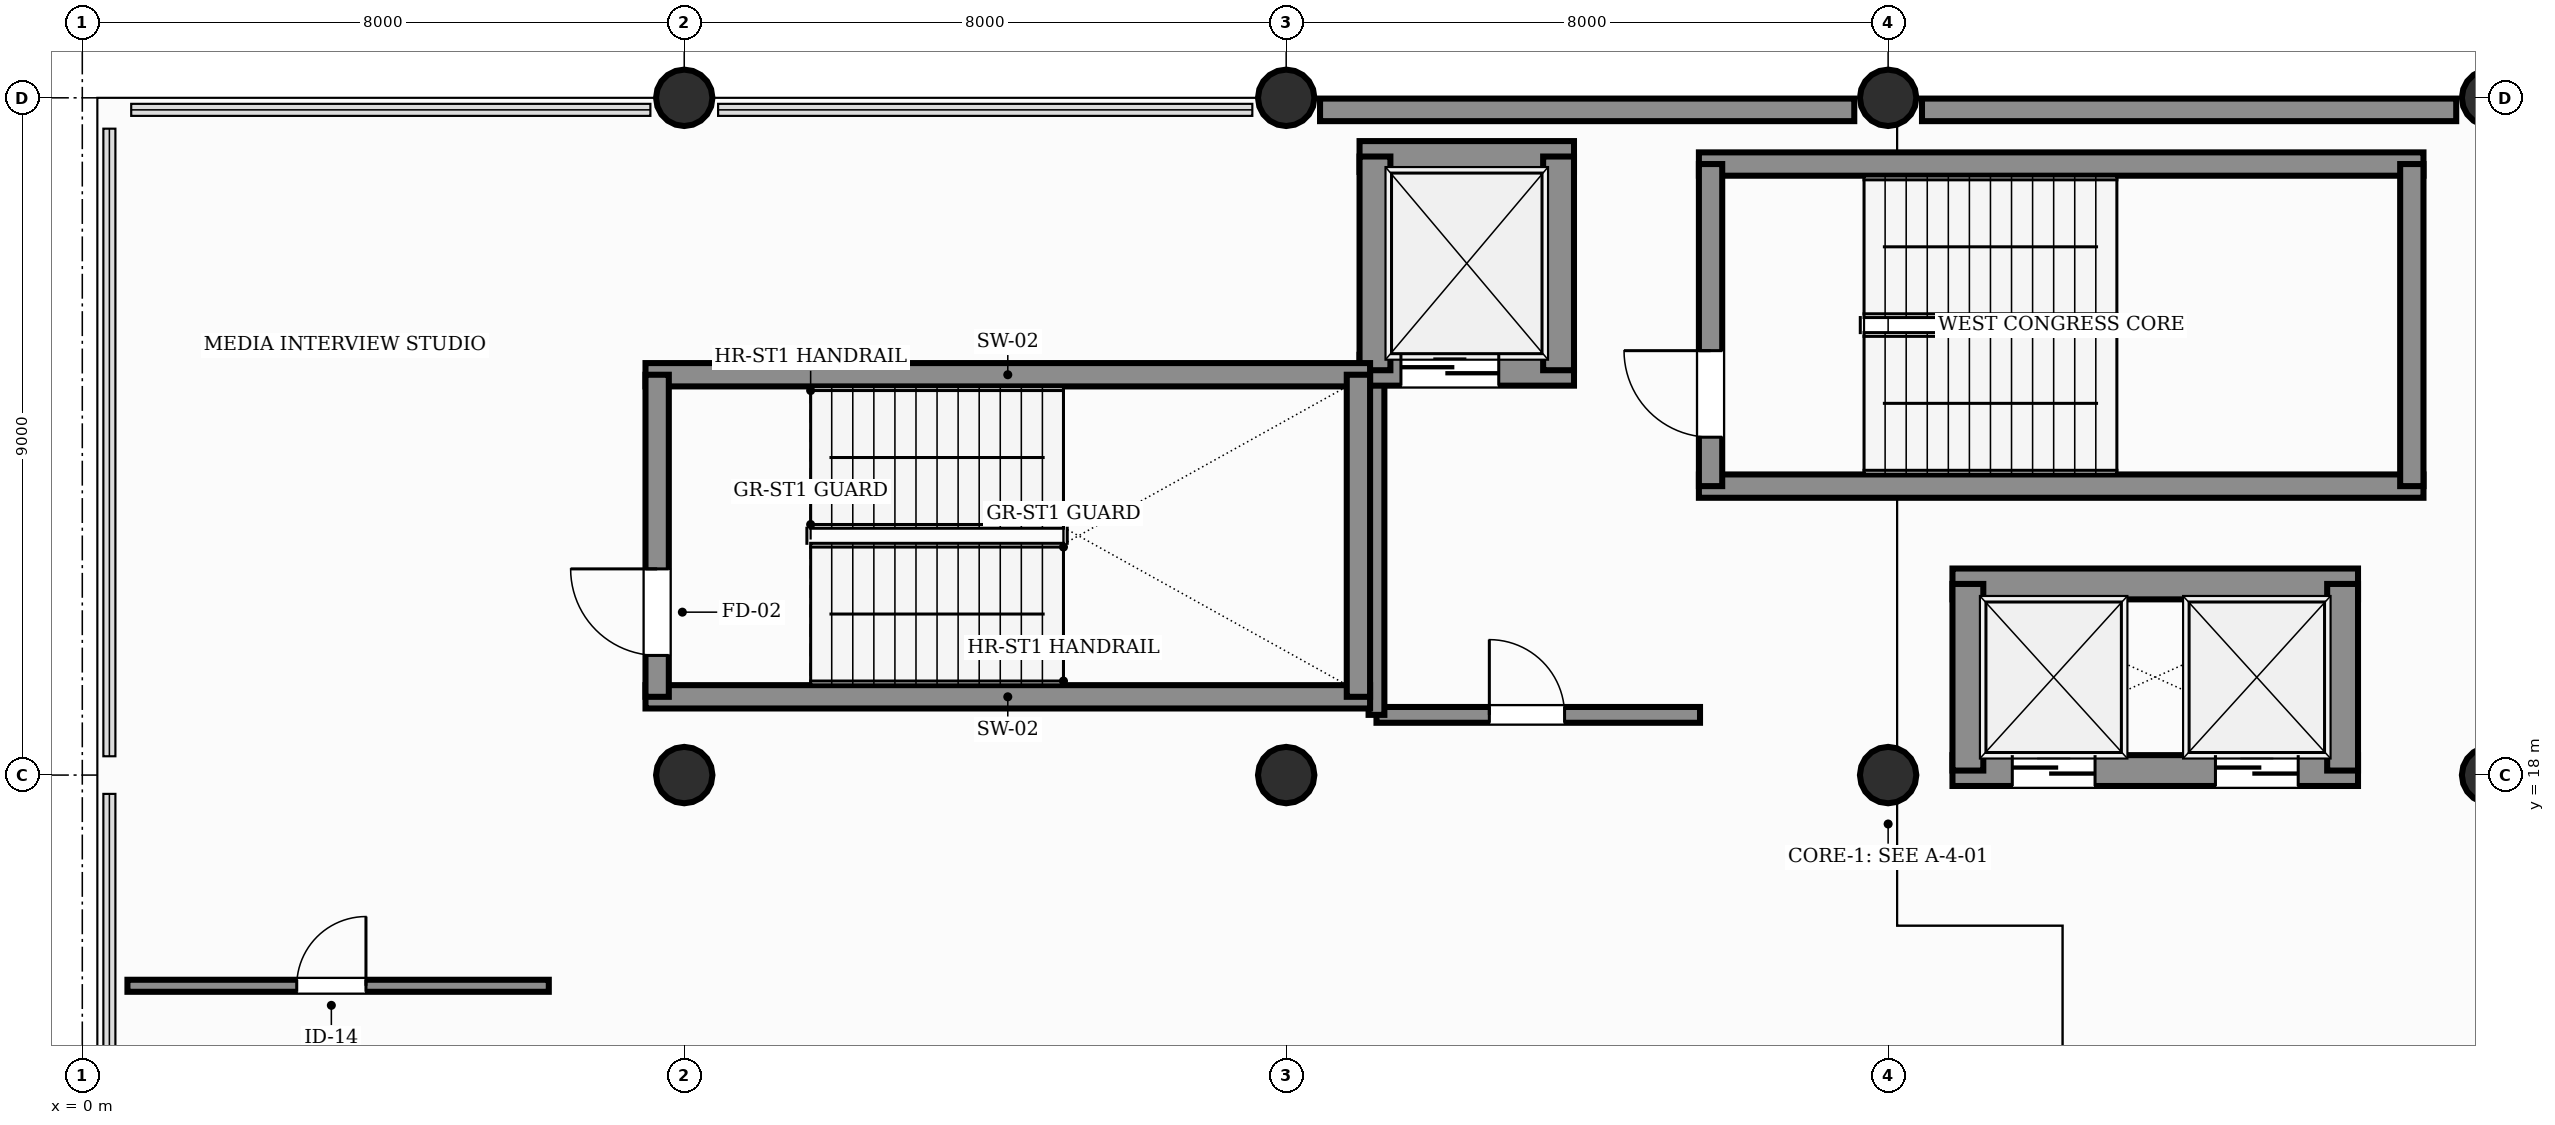
"""IFC4 building model, lengths in metres.
Left out: names, types, materials, properties, quantities, classifications, styles, units other than length and angle.
Written with IfcOpenShell. Run it as: python <this file> out.ifc"""

import sys

from ifc_helpers import new_model, si_unit, direction, frame, frame_2d, origin, origin_2d, place, context, subcontext, project, spatial, rectangle, circle, extrude, element, fill, save


model = new_model("IFC4")
c1 = context("Model", 3, precision=1e-05, world=origin(), true_north=direction((0.0, 1.0)))
c2 = subcontext(c1, "Body", "Model", "MODEL_VIEW")
j1 = project(units=[si_unit("LENGTHUNIT", "METRE"), si_unit("PLANEANGLEUNIT", "RADIAN")], contexts=[c1])
p1 = place(None, origin())
s1 = spatial("IfcSite", under=j1, at=p1, CompositionType="ELEMENT")
p2 = place(p1, origin())
s2 = spatial("IfcBuilding", under=s1, at=p2, CompositionType="ELEMENT")
p3 = place(p2, frame((0.0, 0.0, 16.2)))
s3 = spatial("IfcBuildingStorey", under=s2, at=p3, CompositionType="ELEMENT", Elevation=16.2)
for number, where, z_axis, x_axis in (
    (1, (8.0, 18.0, 0.0), (0.0, 0.0, 1.0), (1.0, 0.0, 0.0)),
    (2, (8.0, 27.0, 0.0), (0.0, 0.0, 1.0), (1.0, 0.0, 0.0)),
    (3, (16.0, 18.0, 0.0), (0.0, 0.0, 1.0), (1.0, 0.0, 0.0)),
    (4, (16.0, 27.0, 0.0), (0.0, 0.0, 1.0), (1.0, 0.0, 0.0)),
    (5, (24.0, 18.0, 0.0), (0.0, 0.0, 1.0), (1.0, 0.0, 0.0)),
    (6, (24.0, 27.0, 0.0), (0.0, 0.0, 1.0), (1.0, 0.0, 0.0)),
    (7, (32.0, 18.0, 0.0), (0.0, 0.0, 1.0), (1.0, 0.0, 0.0)),
    (8, (32.0, 27.0, 0.0), (0.0, 0.0, 1.0), (1.0, 0.0, 0.0)),
):
    element("IfcColumn", number, at=place(p3, frame(where, z_axis=z_axis, x_axis=x_axis)), inside=s3, PredefinedType="COLUMN", context=c2, shape_type="SweptSolid", body=[
        extrude(circle(Radius=0.375, at=origin_2d()), origin(), (0.0, 0.0, 1.0), 4.8),
    ])
for number, where, z_axis, x_axis in (
    (9, (16.45, 26.84, 0.0), (0.0, 0.0, 1.0), (1.0, 0.0, 0.0)),
    (10, (24.45, 26.84, 0.0), (0.0, 0.0, 1.0), (1.0, 0.0, 0.0)),
):
    element("IfcWall", number, at=place(p3, frame(where, z_axis=z_axis, x_axis=x_axis)), inside=s3, PredefinedType="SOLIDWALL", context=c2, shape_type="SweptSolid", body=[
        extrude(rectangle(XDim=7.1, YDim=0.3, at=frame_2d((3.55, 0.0))), origin(), (0.0, 0.0, 1.0), 3.6),
    ])
for number, where, z_axis, x_axis in (
    (11, (21.485, 21.84, 0.0), (0.0, 0.0, 1.0), (1.0, 0.0, 0.0)),
    (12, (21.485, 26.12, 0.0), (0.0, 0.0, 1.0), (1.0, 0.0, 0.0)),
):
    element("IfcWall", number, at=place(p3, frame(where, z_axis=z_axis, x_axis=x_axis)), inside=s3, PredefinedType="SHEAR", context=c2, shape_type="SweptSolid", body=[
        extrude(rectangle(XDim=9.63, YDim=0.31, at=frame_2d((4.815, 0.0))), origin(), (0.0, 0.0, 1.0), 4.8),
    ])
p4 = place(p3, frame((21.64, 21.84, 0.0), z_axis=(0.0, 0.0, 1.0), x_axis=(0.0, 1.0, 0.0)))
e13 = element("IfcWall", 13, at=p4, inside=s3, PredefinedType="SHEAR", context=c2, shape_type="SweptSolid", body=[
    extrude(rectangle(XDim=4.28, YDim=0.31, at=frame_2d((2.14, 0.0))), origin(), (0.0, 0.0, 1.0), 4.8),
])
p5 = place(p4, frame((0.65, 0.0, 0.0)))
e14 = element("IfcOpeningElement", 14, at=p5, cuts=e13, PredefinedType="OPENING", context=c2, shape_type="SweptSolid", body=[
    extrude(rectangle(XDim=1.15, YDim=2.2, at=frame_2d((0.575, 1.1))), frame((0.0, 0.165, 0.0), z_axis=(0.0, -1.0, 0.0), x_axis=(1.0, 0.0, 0.0)), (0.0, 0.0, 1.0), 0.33),
])
p6 = place(p3, frame((30.96, 21.84, 0.0), z_axis=(0.0, 0.0, 1.0), x_axis=(0.0, 1.0, 0.0)))
e15 = element("IfcWall", 15, at=p6, inside=s3, PredefinedType="SHEAR", context=c2, shape_type="SweptSolid", body=[
    extrude(rectangle(XDim=4.28, YDim=0.31, at=frame_2d((2.14, 0.0))), origin(), (0.0, 0.0, 1.0), 4.8),
])
p7 = place(p3, frame((17.2, 18.8, 0.0), z_axis=(0.0, 0.0, 1.0), x_axis=(1.0, 0.0, 0.0)))
e16 = element("IfcWall", 16, at=p7, inside=s3, PredefinedType="PARTITIONING", context=c2, shape_type="SweptSolid", body=[
    extrude(rectangle(XDim=4.3, YDim=0.21, at=frame_2d((2.15, 0.0))), origin(), (0.0, 0.0, 1.0), 3.55),
])
p8 = place(p7, frame((1.5, 0.0, 0.0)))
e17 = element("IfcOpeningElement", 17, at=p8, cuts=e16, PredefinedType="OPENING", context=c2, shape_type="SweptSolid", body=[
    extrude(rectangle(XDim=1.0, YDim=2.15, at=frame_2d((0.5, 1.075))), frame((0.0, 0.115, 0.0), z_axis=(0.0, -1.0, 0.0), x_axis=(1.0, 0.0, 0.0)), (0.0, 0.0, 1.0), 0.23),
])
p9 = place(p3, frame((17.2, 18.8, 0.0), z_axis=(0.0, 0.0, 1.0), x_axis=(0.0, 1.0, 0.0)))
e18 = element("IfcWall", 18, at=p9, inside=s3, PredefinedType="PARTITIONING", context=c2, shape_type="SweptSolid", body=[
    extrude(rectangle(XDim=4.6, YDim=0.21, at=frame_2d((2.3, 0.0))), origin(), (0.0, 0.0, 1.0), 3.55),
])
p10 = place(p3, frame((16.975, 23.38, 0.0), z_axis=(0.0, 0.0, 1.0), x_axis=(1.0, 0.0, 0.0)))
e19 = element("IfcWall", 19, at=p10, inside=s3, PredefinedType="SHEAR", context=c2, shape_type="SweptSolid", body=[
    extrude(rectangle(XDim=2.85, YDim=0.41, at=frame_2d((1.425, 0.0))), origin(), (0.0, 0.0, 1.0), 4.8),
])
p11 = place(p10, frame((0.55, 0.0, 0.0)))
e20 = element("IfcOpeningElement", 20, at=p11, cuts=e19, PredefinedType="OPENING", context=c2, shape_type="SweptSolid", body=[
    extrude(rectangle(XDim=1.3, YDim=2.25, at=frame_2d((0.65, 1.125))), frame((0.0, 0.215, 0.0), z_axis=(0.0, -1.0, 0.0), x_axis=(1.0, 0.0, 0.0)), (0.0, 0.0, 1.0), 0.43),
])
p12 = place(p3, frame((16.975, 26.22, 0.0), z_axis=(0.0, 0.0, 1.0), x_axis=(1.0, 0.0, 0.0)))
e21 = element("IfcWall", 21, at=p12, inside=s3, PredefinedType="SHEAR", context=c2, shape_type="SweptSolid", body=[
    extrude(rectangle(XDim=2.85, YDim=0.41, at=frame_2d((1.425, 0.0))), origin(), (0.0, 0.0, 1.0), 4.8),
])
for number, where, z_axis, x_axis in (
    (22, (17.18, 23.38, 0.0), (0.0, 0.0, 1.0), (0.0, 1.0, 0.0)),
    (23, (19.62, 23.38, 0.0), (0.0, 0.0, 1.0), (0.0, 1.0, 0.0)),
):
    element("IfcWall", number, at=place(p3, frame(where, z_axis=z_axis, x_axis=x_axis)), inside=s3, PredefinedType="SHEAR", context=c2, shape_type="SweptSolid", body=[
        extrude(rectangle(XDim=2.84, YDim=0.41, at=frame_2d((1.42, 0.0))), origin(), (0.0, 0.0, 1.0), 4.8),
    ])
p13 = place(p3, frame((24.855, 18.06, 0.0), z_axis=(0.0, 0.0, 1.0), x_axis=(1.0, 0.0, 0.0)))
e24 = element("IfcWall", 24, at=p13, inside=s3, PredefinedType="SHEAR", context=c2, shape_type="SweptSolid", body=[
    extrude(rectangle(XDim=5.39, YDim=0.41, at=frame_2d((2.695, 0.0))), origin(), (0.0, 0.0, 1.0), 4.8),
])
p14 = place(p13, frame((0.795, 0.0, 0.0)))
e25 = element("IfcOpeningElement", 25, at=p14, cuts=e24, PredefinedType="OPENING", context=c2, shape_type="SweptSolid", body=[
    extrude(rectangle(XDim=1.1, YDim=2.2, at=frame_2d((0.55, 1.1))), frame((0.0, 0.215, 0.0), z_axis=(0.0, -1.0, 0.0), x_axis=(1.0, 0.0, 0.0)), (0.0, 0.0, 1.0), 0.43),
])
p15 = place(p13, frame((3.495, 0.0, 0.0)))
e26 = element("IfcOpeningElement", 26, at=p15, cuts=e24, PredefinedType="OPENING", context=c2, shape_type="SweptSolid", body=[
    extrude(rectangle(XDim=1.1, YDim=2.2, at=frame_2d((0.55, 1.1))), frame((0.0, 0.215, 0.0), z_axis=(0.0, -1.0, 0.0), x_axis=(1.0, 0.0, 0.0)), (0.0, 0.0, 1.0), 0.43),
])
p16 = place(p3, frame((24.855, 20.54, 0.0), z_axis=(0.0, 0.0, 1.0), x_axis=(1.0, 0.0, 0.0)))
e27 = element("IfcWall", 27, at=p16, inside=s3, PredefinedType="SHEAR", context=c2, shape_type="SweptSolid", body=[
    extrude(rectangle(XDim=5.39, YDim=0.41, at=frame_2d((2.695, 0.0))), origin(), (0.0, 0.0, 1.0), 4.8),
])
for number, where, z_axis, x_axis in (
    (28, (25.06, 18.06, 0.0), (0.0, 0.0, 1.0), (0.0, 1.0, 0.0)),
    (29, (30.04, 18.06, 0.0), (0.0, 0.0, 1.0), (0.0, 1.0, 0.0)),
):
    element("IfcWall", number, at=place(p3, frame(where, z_axis=z_axis, x_axis=x_axis)), inside=s3, PredefinedType="SHEAR", context=c2, shape_type="SweptSolid", body=[
        extrude(rectangle(XDim=2.48, YDim=0.41, at=frame_2d((1.24, 0.0))), origin(), (0.0, 0.0, 1.0), 4.8),
    ])
for number, where, z_axis, x_axis in (
    (30, (7.485, 19.04, 0.0), (0.0, 0.0, 1.0), (1.0, 0.0, 0.0)),
    (31, (7.485, 23.32, 0.0), (0.0, 0.0, 1.0), (1.0, 0.0, 0.0)),
):
    element("IfcWall", number, at=place(p3, frame(where, z_axis=z_axis, x_axis=x_axis)), inside=s3, PredefinedType="SHEAR", context=c2, shape_type="SweptSolid", body=[
        extrude(rectangle(XDim=9.63, YDim=0.31, at=frame_2d((4.815, 0.0))), origin(), (0.0, 0.0, 1.0), 4.8),
    ])
p17 = place(p3, frame((7.64, 19.04, 0.0), z_axis=(0.0, 0.0, 1.0), x_axis=(0.0, 1.0, 0.0)))
e32 = element("IfcWall", 32, at=p17, inside=s3, PredefinedType="SHEAR", context=c2, shape_type="SweptSolid", body=[
    extrude(rectangle(XDim=4.28, YDim=0.31, at=frame_2d((2.14, 0.0))), origin(), (0.0, 0.0, 1.0), 4.8),
])
p18 = place(p17, frame((0.55, 0.0, 0.0)))
e33 = element("IfcOpeningElement", 33, at=p18, cuts=e32, PredefinedType="OPENING", context=c2, shape_type="SweptSolid", body=[
    extrude(rectangle(XDim=1.15, YDim=2.2, at=frame_2d((0.575, 1.1))), frame((0.0, 0.165, 0.0), z_axis=(0.0, -1.0, 0.0), x_axis=(1.0, 0.0, 0.0)), (0.0, 0.0, 1.0), 0.33),
])
p19 = place(p3, frame((16.96, 19.04, 0.0), z_axis=(0.0, 0.0, 1.0), x_axis=(0.0, 1.0, 0.0)))
e34 = element("IfcWall", 34, at=p19, inside=s3, PredefinedType="SHEAR", context=c2, shape_type="SweptSolid", body=[
    extrude(rectangle(XDim=4.28, YDim=0.31, at=frame_2d((2.14, 0.0))), origin(), (0.0, 0.0, 1.0), 4.8),
])
p20 = place(p3, frame((0.6, 15.2, 0.0), z_axis=(0.0, 0.0, 1.0), x_axis=(1.0, 0.0, 0.0)))
e35 = element("IfcWall", 35, at=p20, inside=s3, PredefinedType="PARTITIONING", context=c2, shape_type="SweptSolid", body=[
    extrude(rectangle(XDim=5.6, YDim=0.16, at=frame_2d((2.8, 0.0))), origin(), (0.0, 0.0, 1.0), 3.55),
])
p21 = place(p20, frame((2.25, 0.0, 0.0)))
e36 = element("IfcOpeningElement", 36, at=p21, cuts=e35, PredefinedType="OPENING", context=c2, shape_type="SweptSolid", body=[
    extrude(rectangle(XDim=0.92, YDim=2.15, at=frame_2d((0.46, 1.075))), frame((0.0, 0.09, 0.0), z_axis=(0.0, -1.0, 0.0), x_axis=(1.0, 0.0, 0.0)), (0.0, 0.0, 1.0), 0.18),
])
p22 = place(p5, origin())
e37 = element("IfcDoor", 37, at=p22, inside=s3, OperationType="SINGLE_SWING_RIGHT", PredefinedType="DOOR", context=c2, shape_type="SweptSolid", body=[
    extrude(rectangle(XDim=1.15, YDim=2.2, at=frame_2d((0.575, 1.1))), frame((0.0, 0.025, 0.0), z_axis=(0.0, -1.0, 0.0), x_axis=(1.0, 0.0, 0.0)), (0.0, 0.0, 1.0), 0.05),
])
fill(e14, e37)
p23 = place(p8, origin())
e38 = element("IfcDoor", 38, at=p23, inside=s3, OperationType="SINGLE_SWING_LEFT", PredefinedType="DOOR", context=c2, shape_type="SweptSolid", body=[
    extrude(rectangle(XDim=1.0, YDim=2.15, at=frame_2d((0.5, 1.075))), frame((0.0, 0.025, 0.0), z_axis=(0.0, -1.0, 0.0), x_axis=(1.0, 0.0, 0.0)), (0.0, 0.0, 1.0), 0.05),
])
fill(e17, e38)
p24 = place(p11, origin())
e39 = element("IfcDoor", 39, at=p24, inside=s3, OperationType="DOUBLE_DOOR_SLIDING", PredefinedType="DOOR", context=c2, shape_type="SweptSolid", body=[
    extrude(rectangle(XDim=1.3, YDim=2.25, at=frame_2d((0.65, 1.125))), frame((0.0, 0.025, 0.0), z_axis=(0.0, -1.0, 0.0), x_axis=(1.0, 0.0, 0.0)), (0.0, 0.0, 1.0), 0.05),
])
fill(e20, e39)
p25 = place(p14, origin())
e40 = element("IfcDoor", 40, at=p25, inside=s3, OperationType="DOUBLE_DOOR_SLIDING", PredefinedType="DOOR", context=c2, shape_type="SweptSolid", body=[
    extrude(rectangle(XDim=1.1, YDim=2.2, at=frame_2d((0.55, 1.1))), frame((0.0, 0.025, 0.0), z_axis=(0.0, -1.0, 0.0), x_axis=(1.0, 0.0, 0.0)), (0.0, 0.0, 1.0), 0.05),
])
fill(e25, e40)
p26 = place(p15, origin())
e41 = element("IfcDoor", 41, at=p26, inside=s3, OperationType="DOUBLE_DOOR_SLIDING", PredefinedType="DOOR", context=c2, shape_type="SweptSolid", body=[
    extrude(rectangle(XDim=1.1, YDim=2.2, at=frame_2d((0.55, 1.1))), frame((0.0, 0.025, 0.0), z_axis=(0.0, -1.0, 0.0), x_axis=(1.0, 0.0, 0.0)), (0.0, 0.0, 1.0), 0.05),
])
fill(e26, e41)
p27 = place(p18, origin())
e42 = element("IfcDoor", 42, at=p27, inside=s3, OperationType="SINGLE_SWING_RIGHT", PredefinedType="DOOR", context=c2, shape_type="SweptSolid", body=[
    extrude(rectangle(XDim=1.15, YDim=2.2, at=frame_2d((0.575, 1.1))), frame((0.0, 0.025, 0.0), z_axis=(0.0, -1.0, 0.0), x_axis=(1.0, 0.0, 0.0)), (0.0, 0.0, 1.0), 0.05),
])
fill(e33, e42)
p28 = place(p21, origin())
e43 = element("IfcDoor", 43, at=p28, inside=s3, OperationType="SINGLE_SWING_RIGHT", PredefinedType="DOOR", context=c2, shape_type="SweptSolid", body=[
    extrude(rectangle(XDim=0.92, YDim=2.15, at=frame_2d((0.46, 1.075))), frame((0.0, 0.025, 0.0), z_axis=(0.0, -1.0, 0.0), x_axis=(1.0, 0.0, 0.0)), (0.0, 0.0, 1.0), 0.05),
])
fill(e36, e43)
save(model, sys.argv[1])
